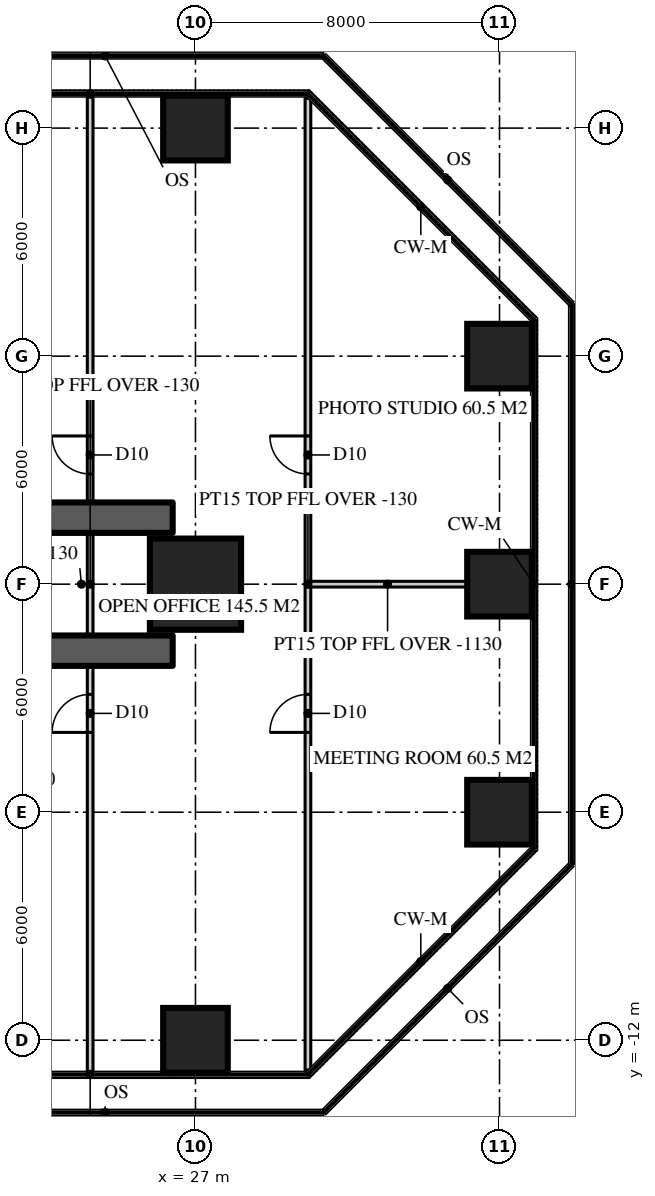
"""IFC4 building model, lengths in metres.
Left out: names, types, materials, properties, quantities, classifications, styles, units other than length and angle.
Written with IfcOpenShell. Run it as: python <this file> out.ifc"""

import sys

from ifc_helpers import new_model, si_unit, direction, frame, frame_2d, origin, origin_2d, place, context, subcontext, project, spatial, rectangle, extrude, element, fill, save


model = new_model("IFC4")
c1 = context("Model", 3, precision=1e-05, world=origin(), true_north=direction((0.0, 1.0)))
c2 = subcontext(c1, "Body", "Model", "MODEL_VIEW")
j1 = project(units=[si_unit("LENGTHUNIT", "METRE"), si_unit("PLANEANGLEUNIT", "RADIAN")], contexts=[c1])
p1 = place(None, origin())
s1 = spatial("IfcSite", under=j1, at=p1, CompositionType="ELEMENT")
p2 = place(p1, origin())
s2 = spatial("IfcBuilding", under=s1, at=p2, CompositionType="ELEMENT")
p3 = place(p2, frame((0.0, 0.0, 190.5)))
s3 = spatial("IfcBuildingStorey", under=s2, at=p3, CompositionType="ELEMENT", Elevation=190.5)
for number, where, z_axis, x_axis in (
    (1, (11.15, -1.75, 0.0), (0.0, 0.0, 1.0), (1.0, 0.0, 0.0)),
    (2, (11.15, 1.75, 0.0), (0.0, 0.0, 1.0), (1.0, 0.0, 0.0)),
):
    element("IfcWall", number, at=place(p3, frame(where, z_axis=z_axis, x_axis=x_axis)), inside=s3, PredefinedType="SHEAR", context=c2, shape_type="SweptSolid", body=[
        extrude(rectangle(XDim=15.25, YDim=0.8, at=frame_2d((7.625, 0.0))), origin(), (0.0, 0.0, 1.0), 3.9),
    ])
for number, where, z_axis, x_axis in (
    (3, (27.0, -12.0, 0.0), (0.0, 0.0, 1.0), (1.0, 0.0, 0.0)),
    (4, (35.0, -6.0, 0.0), (0.0, 0.0, 1.0), (1.0, 0.0, 0.0)),
):
    element("IfcColumn", number, at=place(p3, frame(where, z_axis=z_axis, x_axis=x_axis)), inside=s3, PredefinedType="COLUMN", context=c2, shape_type="SweptSolid", body=[
        extrude(rectangle(XDim=1.7, YDim=1.7, at=origin_2d()), origin(), (0.0, 0.0, 1.0), 3.9),
    ])
p4 = place(p3, frame((27.0, 0.0, 0.0), z_axis=(0.0, 0.0, 1.0), x_axis=(1.0, 0.0, 0.0)))
e5 = element("IfcColumn", 5, at=p4, inside=s3, PredefinedType="COLUMN", context=c2, shape_type="SweptSolid", body=[
    extrude(rectangle(XDim=2.4, YDim=2.4, at=origin_2d()), origin(), (0.0, 0.0, 1.0), 3.9),
])
for number, where, z_axis, x_axis in (
    (6, (35.0, 0.0, 0.0), (0.0, 0.0, 1.0), (1.0, 0.0, 0.0)),
    (7, (35.0, 6.0, 0.0), (0.0, 0.0, 1.0), (1.0, 0.0, 0.0)),
    (8, (27.0, 12.0, 0.0), (0.0, 0.0, 1.0), (1.0, 0.0, 0.0)),
):
    element("IfcColumn", number, at=place(p3, frame(where, z_axis=z_axis, x_axis=x_axis)), inside=s3, PredefinedType="COLUMN", context=c2, shape_type="SweptSolid", body=[
        extrude(rectangle(XDim=1.7, YDim=1.7, at=origin_2d()), origin(), (0.0, 0.0, 1.0), 3.9),
    ])
p5 = place(p3, frame((24.229, -12.82, 0.0), z_axis=(0.0, 0.0, 1.0), x_axis=(0.0, 1.0, 0.0)))
e9 = element("IfcWall", 9, at=p5, inside=s3, PredefinedType="PARTITIONING", context=c2, shape_type="SweptSolid", body=[
    extrude(rectangle(XDim=25.64, YDim=0.15, at=frame_2d((12.82, 0.0))), origin(), (0.0, 0.0, 1.0), 3.77),
])
p6 = place(p5, frame((15.72, 0.0, 0.0)))
e10 = element("IfcOpeningElement", 10, at=p6, cuts=e9, PredefinedType="OPENING", context=c2, shape_type="SweptSolid", body=[
    extrude(rectangle(XDim=1.0, YDim=2.2, at=frame_2d((0.5, 1.1))), frame((0.0, 0.085, 0.0), z_axis=(0.0, -1.0, 0.0), x_axis=(1.0, 0.0, 0.0)), (0.0, 0.0, 1.0), 0.17),
])
p7 = place(p5, frame((8.92, 0.0, 0.0)))
e11 = element("IfcOpeningElement", 11, at=p7, cuts=e9, PredefinedType="OPENING", context=c2, shape_type="SweptSolid", body=[
    extrude(rectangle(XDim=1.0, YDim=2.2, at=frame_2d((0.5, 1.1))), frame((0.0, 0.085, 0.0), z_axis=(0.0, -1.0, 0.0), x_axis=(1.0, 0.0, 0.0)), (0.0, 0.0, 1.0), 0.17),
])
p8 = place(p3, frame((29.959, -12.786, 0.0), z_axis=(0.0, 0.0, 1.0), x_axis=(0.0, 1.0, 0.0)))
e12 = element("IfcWall", 12, at=p8, inside=s3, PredefinedType="PARTITIONING", context=c2, shape_type="SweptSolid", body=[
    extrude(rectangle(XDim=25.573, YDim=0.15, at=frame_2d((12.786, 0.0))), origin(), (0.0, 0.0, 1.0), 3.77),
])
p9 = place(p8, frame((15.687, 0.0, 0.0)))
e13 = element("IfcOpeningElement", 13, at=p9, cuts=e12, PredefinedType="OPENING", context=c2, shape_type="SweptSolid", body=[
    extrude(rectangle(XDim=1.0, YDim=2.2, at=frame_2d((0.5, 1.1))), frame((0.0, 0.085, 0.0), z_axis=(0.0, -1.0, 0.0), x_axis=(1.0, 0.0, 0.0)), (0.0, 0.0, 1.0), 0.17),
])
p10 = place(p8, frame((8.886, 0.0, 0.0)))
e14 = element("IfcOpeningElement", 14, at=p10, cuts=e12, PredefinedType="OPENING", context=c2, shape_type="SweptSolid", body=[
    extrude(rectangle(XDim=1.0, YDim=2.2, at=frame_2d((0.5, 1.1))), frame((0.0, 0.085, 0.0), z_axis=(0.0, -1.0, 0.0), x_axis=(1.0, 0.0, 0.0)), (0.0, 0.0, 1.0), 0.17),
])
p11 = place(p3, frame((29.959, 0.0, 0.0), z_axis=(0.0, 0.0, 1.0), x_axis=(1.0, 0.0, 0.0)))
e15 = element("IfcWall", 15, at=p11, inside=s3, PredefinedType="PARTITIONING", context=c2, shape_type="SweptSolid", body=[
    extrude(rectangle(XDim=4.191, YDim=0.15, at=frame_2d((2.095, 0.0))), origin(), (0.0, 0.0, 1.0), 2.77),
])
p12 = place(p6, origin())
e16 = element("IfcDoor", 16, at=p12, inside=s3, OperationType="SINGLE_SWING_RIGHT", PredefinedType="DOOR", context=c2, shape_type="SweptSolid", body=[
    extrude(rectangle(XDim=1.0, YDim=2.2, at=frame_2d((0.5, 1.1))), frame((0.0, 0.025, 0.0), z_axis=(0.0, -1.0, 0.0), x_axis=(1.0, 0.0, 0.0)), (0.0, 0.0, 1.0), 0.05),
])
fill(e10, e16)
p13 = place(p7, origin())
e17 = element("IfcDoor", 17, at=p13, inside=s3, OperationType="SINGLE_SWING_LEFT", PredefinedType="DOOR", context=c2, shape_type="SweptSolid", body=[
    extrude(rectangle(XDim=1.0, YDim=2.2, at=frame_2d((0.5, 1.1))), frame((0.0, 0.025, 0.0), z_axis=(0.0, -1.0, 0.0), x_axis=(1.0, 0.0, 0.0)), (0.0, 0.0, 1.0), 0.05),
])
fill(e11, e17)
p14 = place(p9, origin())
e18 = element("IfcDoor", 18, at=p14, inside=s3, OperationType="SINGLE_SWING_RIGHT", PredefinedType="DOOR", context=c2, shape_type="SweptSolid", body=[
    extrude(rectangle(XDim=1.0, YDim=2.2, at=frame_2d((0.5, 1.1))), frame((0.0, 0.025, 0.0), z_axis=(0.0, -1.0, 0.0), x_axis=(1.0, 0.0, 0.0)), (0.0, 0.0, 1.0), 0.05),
])
fill(e13, e18)
p15 = place(p10, origin())
e19 = element("IfcDoor", 19, at=p15, inside=s3, OperationType="SINGLE_SWING_LEFT", PredefinedType="DOOR", context=c2, shape_type="SweptSolid", body=[
    extrude(rectangle(XDim=1.0, YDim=2.2, at=frame_2d((0.5, 1.1))), frame((0.0, 0.025, 0.0), z_axis=(0.0, -1.0, 0.0), x_axis=(1.0, 0.0, 0.0)), (0.0, 0.0, 1.0), 0.05),
])
fill(e14, e19)
save(model, sys.argv[1])
